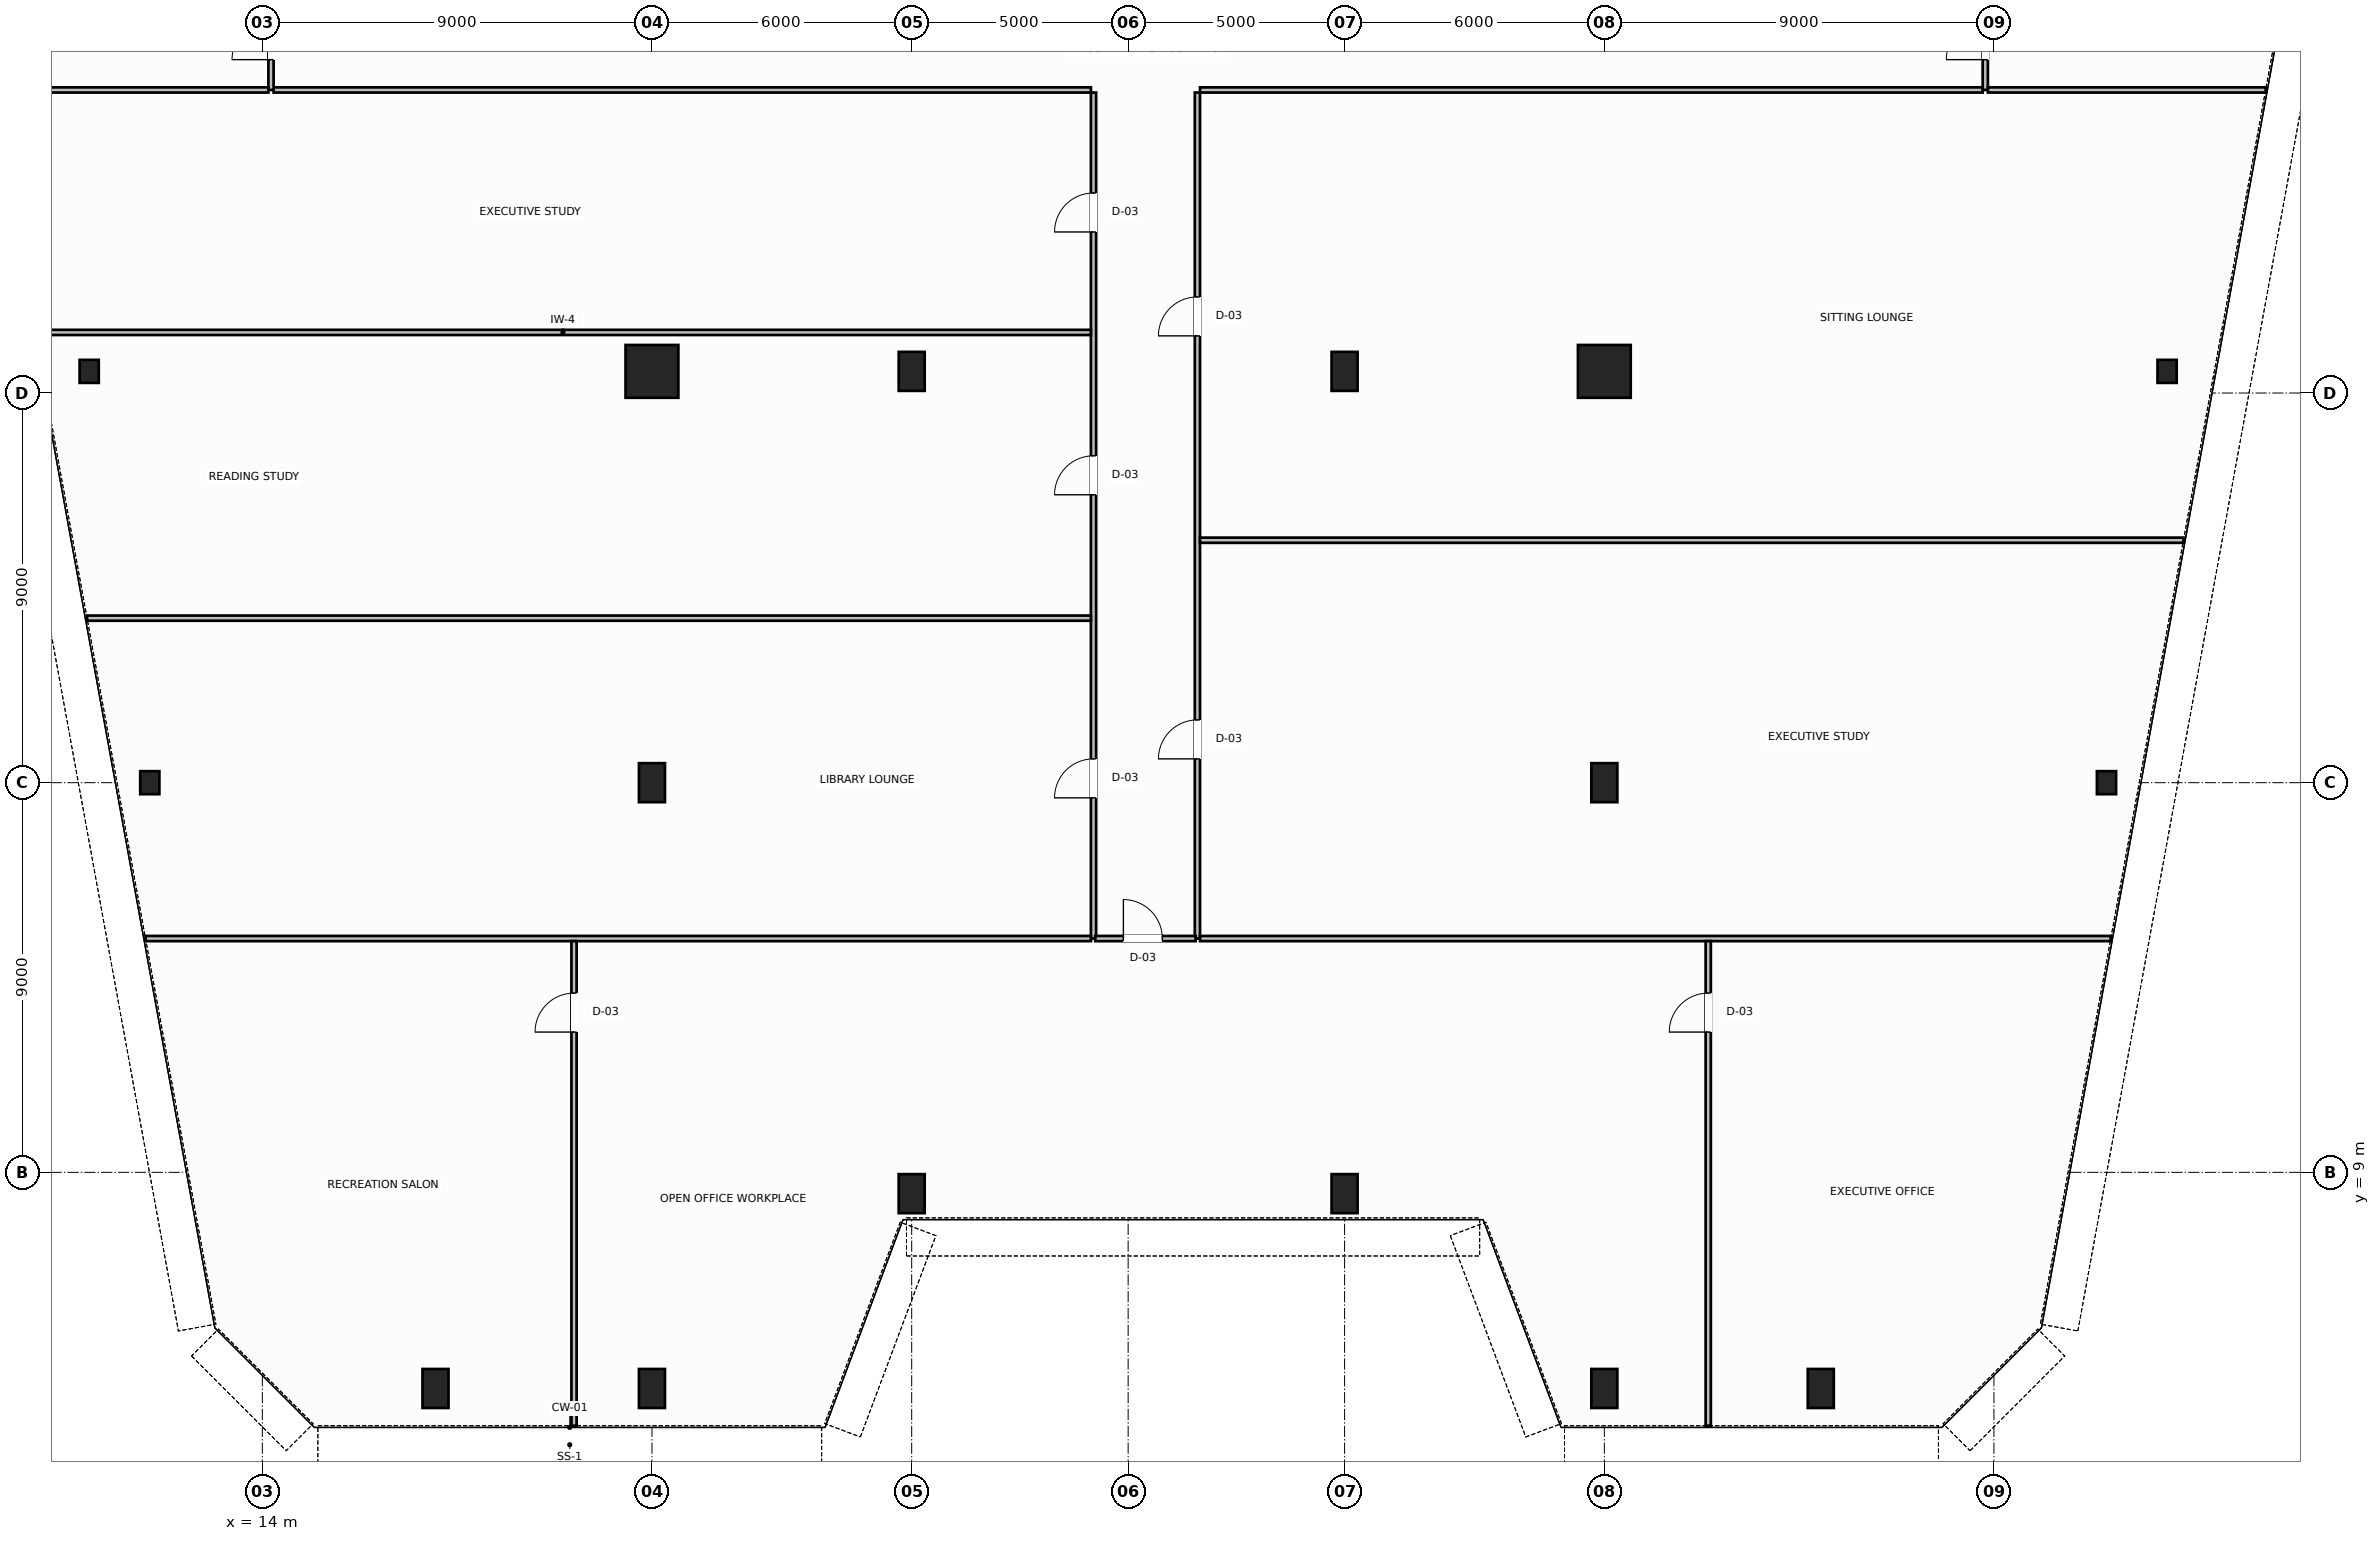
"""IFC4 building model, lengths in metres.
Left out: names, types, materials, properties, quantities, classifications, styles, units other than length and angle.
Written with IfcOpenShell. Run it as: python <this file> out.ifc"""

import sys

from ifc_helpers import new_model, si_unit, direction, frame, frame_2d, origin, origin_2d, place, context, subcontext, project, spatial, rectangle, hollow_rectangle, hollow_circle, i_section, extrude, source, transform, mapped, element, fill, save


model = new_model("IFC4")
c1 = context("Model", 3, precision=1e-05, world=origin(), true_north=direction((0.0, 1.0)))
c2 = subcontext(c1, "Body", "Model", "MODEL_VIEW")
j1 = project(units=[si_unit("LENGTHUNIT", "METRE"), si_unit("PLANEANGLEUNIT", "RADIAN")], contexts=[c1])
p1 = place(None, origin())
s1 = spatial("IfcSite", under=j1, at=p1, CompositionType="ELEMENT")
p2 = place(p1, origin())
s2 = spatial("IfcBuilding", under=s1, at=p2, CompositionType="ELEMENT")
p3 = place(p2, frame((0.0, 0.0, 68.2)))
s3 = spatial("IfcBuildingStorey", under=s2, at=p3, CompositionType="ELEMENT", Elevation=68.2)
m1 = source(origin(), c2, "Body", "SweptSolid", [
    extrude(i_section(OverallWidth=0.442, OverallDepth=0.531, WebThickness=0.065, FlangeThickness=0.076, FilletRadius=0.015, at=origin_2d()), origin(), (0.0, 0.0, 1.0), 3.8),
])
for number, where, z_axis, x_axis in (
    (1, (10.0, 27.5, 0.0), (0.0, 0.0, 1.0), (1.0, 0.0, 0.0)),
    (2, (11.4, 18.0, 0.0), (0.0, 0.0, 1.0), (1.0, 0.0, 0.0)),
    (3, (58.0, 27.5, 0.0), (0.0, 0.0, 1.0), (1.0, 0.0, 0.0)),
    (4, (56.6, 18.0, 0.0), (0.0, 0.0, 1.0), (1.0, 0.0, 0.0)),
):
    element("IfcColumn", number, at=place(p3, frame(where, z_axis=z_axis, x_axis=x_axis)), inside=s3, PredefinedType="COLUMN", context=c2, shape_type="MappedRepresentation", body=[
        mapped(m1, transform((0.0, 0.0, 0.0), scale=1.0)),
    ])
m2 = source(origin(), c2, "Body", "SweptSolid", [
    extrude(hollow_circle(Radius=0.61, WallThickness=0.05, at=origin_2d()), origin(), (0.0, 0.0, 1.0), 3.8),
])
p4 = place(p3, frame((23.0, 27.5, 0.0), z_axis=(0.0, 0.0, 1.0), x_axis=(1.0, 0.0, 0.0)))
e5 = element("IfcColumn", 5, at=p4, inside=s3, PredefinedType="COLUMN", context=c2, shape_type="MappedRepresentation", body=[
    mapped(m2, transform((0.0, 0.0, 0.0), scale=1.0)),
])
m3 = source(origin(), c2, "Body", "SweptSolid", [
    extrude(hollow_rectangle(XDim=0.6, YDim=0.9, WallThickness=0.04, InnerFilletRadius=0.04, OuterFilletRadius=0.08, at=origin_2d()), origin(), (0.0, 0.0, 1.0), 3.8),
])
for number, where, z_axis, x_axis in (
    (6, (29.0, 27.5, 0.0), (0.0, 0.0, 1.0), (1.0, 0.0, 0.0)),
    (7, (39.0, 27.5, 0.0), (0.0, 0.0, 1.0), (1.0, 0.0, 0.0)),
):
    element("IfcColumn", number, at=place(p3, frame(where, z_axis=z_axis, x_axis=x_axis)), inside=s3, PredefinedType="COLUMN", context=c2, shape_type="MappedRepresentation", body=[
        mapped(m3, transform((0.0, 0.0, 0.0), scale=1.0)),
    ])
p5 = place(p3, frame((45.0, 27.5, 0.0), z_axis=(0.0, 0.0, 1.0), x_axis=(1.0, 0.0, 0.0)))
e8 = element("IfcColumn", 8, at=p5, inside=s3, PredefinedType="COLUMN", context=c2, shape_type="MappedRepresentation", body=[
    mapped(m2, transform((0.0, 0.0, 0.0), scale=1.0)),
])
for number, where, z_axis, x_axis in (
    (9, (23.0, 18.0, 0.0), (0.0, 0.0, 1.0), (1.0, 0.0, 0.0)),
    (10, (45.0, 18.0, 0.0), (0.0, 0.0, 1.0), (1.0, 0.0, 0.0)),
):
    element("IfcColumn", number, at=place(p3, frame(where, z_axis=z_axis, x_axis=x_axis)), inside=s3, PredefinedType="COLUMN", context=c2, shape_type="MappedRepresentation", body=[
        mapped(m3, transform((0.0, 0.0, 0.0), scale=1.0)),
    ])
m4 = source(origin(), c2, "Body", "SweptSolid", [
    extrude(hollow_rectangle(XDim=0.6, YDim=0.9, WallThickness=0.04, InnerFilletRadius=0.04, OuterFilletRadius=0.08, at=origin_2d()), origin(), (0.0, 0.0, 1.0), 3.744),
])
for number, where, z_axis, x_axis in (
    (11, (18.0, 4.008, 0.032), (0.0, 0.064, 0.998), (-1.0, 0.0, 0.0)),
    (12, (23.0, 4.008, 0.032), (0.0, 0.064, 0.998), (-1.0, 0.0, 0.0)),
    (13, (29.0, 8.508, 0.032), (0.0, 0.064, 0.998), (-1.0, 0.0, 0.0)),
    (14, (39.0, 8.508, 0.032), (0.0, 0.064, 0.998), (-1.0, 0.0, 0.0)),
    (15, (45.0, 4.008, 0.032), (0.0, 0.064, 0.998), (-1.0, 0.0, 0.0)),
    (16, (50.0, 4.008, 0.032), (0.0, 0.064, 0.998), (-1.0, 0.0, 0.0)),
):
    element("IfcColumn", number, at=place(p3, frame(where, z_axis=z_axis, x_axis=x_axis)), inside=s3, PredefinedType="COLUMN", context=c2, shape_type="MappedRepresentation", body=[
        mapped(m4, transform((0.0, 0.0, 0.0), scale=1.0)),
    ])
p6 = place(p3, frame((14.26, 34.0, 0.0), z_axis=(0.0, 0.0, 1.0), x_axis=(1.0, 0.0, 0.0)))
e17 = element("IfcWall", 17, at=p6, inside=s3, PredefinedType="PARTITIONING", context=c2, shape_type="SweptSolid", body=[
    extrude(rectangle(XDim=18.88, YDim=0.12, at=frame_2d((9.44, 0.0))), origin(), (0.0, 0.0, 1.0), 3.58),
])
p7 = place(p3, frame((35.66, 34.0, 0.0), z_axis=(0.0, 0.0, 1.0), x_axis=(1.0, 0.0, 0.0)))
e18 = element("IfcWall", 18, at=p7, inside=s3, PredefinedType="PARTITIONING", context=c2, shape_type="SweptSolid", body=[
    extrude(rectangle(XDim=18.08, YDim=0.12, at=frame_2d((9.04, 0.0))), origin(), (0.0, 0.0, 1.0), 3.58),
])
p8 = place(p3, frame((14.2, 34.0, 0.0), z_axis=(0.0, 0.0, 1.0), x_axis=(0.0, 1.0, 0.0)))
e19 = element("IfcWall", 19, at=p8, inside=s3, PredefinedType="PARTITIONING", context=c2, shape_type="SweptSolid", body=[
    extrude(rectangle(XDim=2.44, YDim=0.12, at=frame_2d((1.22, 0.0))), origin(), (0.0, 0.0, 1.0), 3.58),
])
p9 = place(p8, frame((0.7, 0.0, 0.0)))
e20 = element("IfcOpeningElement", 20, at=p9, cuts=e19, PredefinedType="OPENING", context=c2, shape_type="SweptSolid", body=[
    extrude(rectangle(XDim=0.9, YDim=2.15, at=frame_2d((0.45, 1.075))), frame((0.0, 0.07, 0.0), z_axis=(0.0, -1.0, 0.0), x_axis=(1.0, 0.0, 0.0)), (0.0, 0.0, 1.0), 0.14),
])
p10 = place(p3, frame((53.8, 34.0, 0.0), z_axis=(0.0, 0.0, 1.0), x_axis=(0.0, 1.0, 0.0)))
e21 = element("IfcWall", 21, at=p10, inside=s3, PredefinedType="PARTITIONING", context=c2, shape_type="SweptSolid", body=[
    extrude(rectangle(XDim=2.44, YDim=0.12, at=frame_2d((1.22, 0.0))), origin(), (0.0, 0.0, 1.0), 3.58),
])
p11 = place(p10, frame((0.7, 0.0, 0.0)))
e22 = element("IfcOpeningElement", 22, at=p11, cuts=e21, PredefinedType="OPENING", context=c2, shape_type="SweptSolid", body=[
    extrude(rectangle(XDim=0.9, YDim=2.15, at=frame_2d((0.45, 1.075))), frame((0.0, 0.07, 0.0), z_axis=(0.0, -1.0, 0.0), x_axis=(1.0, 0.0, 0.0)), (0.0, 0.0, 1.0), 0.14),
])
p12 = place(p3, frame((33.2, 14.4, 0.0), z_axis=(0.0, 0.0, 1.0), x_axis=(0.0, 1.0, 0.0)))
e23 = element("IfcWall", 23, at=p12, inside=s3, PredefinedType="PARTITIONING", context=c2, shape_type="SweptSolid", body=[
    extrude(rectangle(XDim=19.54, YDim=0.12, at=frame_2d((9.77, 0.0))), origin(), (0.0, 0.0, 1.0), 3.58),
])
p13 = place(p12, frame((3.25, 0.0, 0.0)))
e24 = element("IfcOpeningElement", 24, at=p13, cuts=e23, PredefinedType="OPENING", context=c2, shape_type="SweptSolid", body=[
    extrude(rectangle(XDim=0.9, YDim=2.15, at=frame_2d((0.45, 1.075))), frame((0.0, 0.07, 0.0), z_axis=(0.0, -1.0, 0.0), x_axis=(1.0, 0.0, 0.0)), (0.0, 0.0, 1.0), 0.14),
])
p14 = place(p12, frame((10.25, 0.0, 0.0)))
e25 = element("IfcOpeningElement", 25, at=p14, cuts=e23, PredefinedType="OPENING", context=c2, shape_type="SweptSolid", body=[
    extrude(rectangle(XDim=0.9, YDim=2.15, at=frame_2d((0.45, 1.075))), frame((0.0, 0.07, 0.0), z_axis=(0.0, -1.0, 0.0), x_axis=(1.0, 0.0, 0.0)), (0.0, 0.0, 1.0), 0.14),
])
p15 = place(p12, frame((16.32, 0.0, 0.0)))
e26 = element("IfcOpeningElement", 26, at=p15, cuts=e23, PredefinedType="OPENING", context=c2, shape_type="SweptSolid", body=[
    extrude(rectangle(XDim=0.9, YDim=2.15, at=frame_2d((0.45, 1.075))), frame((0.0, 0.07, 0.0), z_axis=(0.0, -1.0, 0.0), x_axis=(1.0, 0.0, 0.0)), (0.0, 0.0, 1.0), 0.14),
])
p16 = place(p3, frame((35.6, 14.4, 0.0), z_axis=(0.0, 0.0, 1.0), x_axis=(0.0, 1.0, 0.0)))
e27 = element("IfcWall", 27, at=p16, inside=s3, PredefinedType="PARTITIONING", context=c2, shape_type="SweptSolid", body=[
    extrude(rectangle(XDim=19.54, YDim=0.12, at=frame_2d((9.77, 0.0))), origin(), (0.0, 0.0, 1.0), 3.58),
])
p17 = place(p16, frame((4.15, 0.0, 0.0)))
e28 = element("IfcOpeningElement", 28, at=p17, cuts=e27, PredefinedType="OPENING", context=c2, shape_type="SweptSolid", body=[
    extrude(rectangle(XDim=0.9, YDim=2.15, at=frame_2d((0.45, 1.075))), frame((0.0, 0.07, 0.0), z_axis=(0.0, -1.0, 0.0), x_axis=(1.0, 0.0, 0.0)), (0.0, 0.0, 1.0), 0.14),
])
p18 = place(p16, frame((13.92, 0.0, 0.0)))
e29 = element("IfcOpeningElement", 29, at=p18, cuts=e27, PredefinedType="OPENING", context=c2, shape_type="SweptSolid", body=[
    extrude(rectangle(XDim=0.9, YDim=2.15, at=frame_2d((0.45, 1.075))), frame((0.0, 0.07, 0.0), z_axis=(0.0, -1.0, 0.0), x_axis=(1.0, 0.0, 0.0)), (0.0, 0.0, 1.0), 0.14),
])
p19 = place(p3, frame((33.24, 14.4, 0.0), z_axis=(0.0, 0.0, 1.0), x_axis=(1.0, 0.0, 0.0)))
e30 = element("IfcWall", 30, at=p19, inside=s3, PredefinedType="PARTITIONING", context=c2, shape_type="SweptSolid", body=[
    extrude(rectangle(XDim=2.32, YDim=0.12, at=frame_2d((1.16, 0.0))), origin(), (0.0, 0.0, 1.0), 3.58),
])
p20 = place(p19, frame((0.65, 0.0, 0.0)))
e31 = element("IfcOpeningElement", 31, at=p20, cuts=e30, PredefinedType="OPENING", context=c2, shape_type="SweptSolid", body=[
    extrude(rectangle(XDim=0.9, YDim=2.15, at=frame_2d((0.45, 1.075))), frame((0.0, 0.07, 0.0), z_axis=(0.0, -1.0, 0.0), x_axis=(1.0, 0.0, 0.0)), (0.0, 0.0, 1.0), 0.14),
])
for number, where, z_axis, x_axis in (
    (32, (7.723, 34.0, 0.0), (0.0, 0.0, 1.0), (1.0, 0.0, 0.0)),
    (33, (53.86, 34.0, 0.0), (0.0, 0.0, 1.0), (1.0, 0.0, 0.0)),
):
    element("IfcWall", number, at=place(p3, frame(where, z_axis=z_axis, x_axis=x_axis)), inside=s3, PredefinedType="PARTITIONING", context=c2, shape_type="SweptSolid", body=[
        extrude(rectangle(XDim=6.417, YDim=0.12, at=frame_2d((3.208, 0.0))), origin(), (0.0, 0.0, 1.0), 3.58),
    ])
p21 = place(p3, frame((9.95, 21.8, 0.0), z_axis=(0.0, 0.0, 1.0), x_axis=(1.0, 0.0, 0.0)))
e34 = element("IfcWall", 34, at=p21, inside=s3, PredefinedType="PARTITIONING", context=c2, shape_type="SweptSolid", body=[
    extrude(rectangle(XDim=23.19, YDim=0.12, at=frame_2d((11.595, 0.0))), origin(), (0.0, 0.0, 1.0), 3.58),
])
p22 = place(p3, frame((8.745, 28.4, 0.0), z_axis=(0.0, 0.0, 1.0), x_axis=(1.0, 0.0, 0.0)))
e35 = element("IfcWall", 35, at=p22, inside=s3, PredefinedType="PARTITIONING", context=c2, shape_type="SweptSolid", body=[
    extrude(rectangle(XDim=24.395, YDim=0.12, at=frame_2d((12.197, 0.0))), origin(), (0.0, 0.0, 1.0), 3.58),
])
p23 = place(p3, frame((35.66, 23.6, 0.0), z_axis=(0.0, 0.0, 1.0), x_axis=(1.0, 0.0, 0.0)))
e36 = element("IfcWall", 36, at=p23, inside=s3, PredefinedType="PARTITIONING", context=c2, shape_type="SweptSolid", body=[
    extrude(rectangle(XDim=22.719, YDim=0.12, at=frame_2d((11.359, 0.0))), origin(), (0.0, 0.0, 1.0), 3.58),
])
p24 = place(p3, frame((11.301, 14.4, 0.0), z_axis=(0.0, 0.0, 1.0), x_axis=(1.0, 0.0, 0.0)))
e37 = element("IfcWall", 37, at=p24, inside=s3, PredefinedType="PARTITIONING", context=c2, shape_type="SweptSolid", body=[
    extrude(rectangle(XDim=21.839, YDim=0.12, at=frame_2d((10.919, 0.0))), origin(), (0.0, 0.0, 1.0), 3.58),
])
p25 = place(p3, frame((35.66, 14.4, 0.0), z_axis=(0.0, 0.0, 1.0), x_axis=(1.0, 0.0, 0.0)))
e38 = element("IfcWall", 38, at=p25, inside=s3, PredefinedType="PARTITIONING", context=c2, shape_type="SweptSolid", body=[
    extrude(rectangle(XDim=21.039, YDim=0.12, at=frame_2d((10.52, 0.0))), origin(), (0.0, 0.0, 1.0), 3.58),
])
p26 = place(p3, frame((21.2, 3.148, 0.0), z_axis=(0.0, 0.0, 1.0), x_axis=(0.0, 1.0, 0.0)))
e39 = element("IfcWall", 39, at=p26, inside=s3, PredefinedType="PARTITIONING", context=c2, shape_type="SweptSolid", body=[
    extrude(rectangle(XDim=11.192, YDim=0.12, at=frame_2d((5.596, 0.0))), origin(), (0.0, 0.0, 1.0), 3.58),
])
p27 = place(p26, frame((9.092, 0.0, 0.0)))
e40 = element("IfcOpeningElement", 40, at=p27, cuts=e39, PredefinedType="OPENING", context=c2, shape_type="SweptSolid", body=[
    extrude(rectangle(XDim=0.9, YDim=2.15, at=frame_2d((0.45, 1.075))), frame((0.0, 0.07, 0.0), z_axis=(0.0, -1.0, 0.0), x_axis=(1.0, 0.0, 0.0)), (0.0, 0.0, 1.0), 0.14),
])
p28 = place(p3, frame((47.4, 3.148, 0.0), z_axis=(0.0, 0.0, 1.0), x_axis=(0.0, 1.0, 0.0)))
e41 = element("IfcWall", 41, at=p28, inside=s3, PredefinedType="PARTITIONING", context=c2, shape_type="SweptSolid", body=[
    extrude(rectangle(XDim=11.192, YDim=0.12, at=frame_2d((5.596, 0.0))), origin(), (0.0, 0.0, 1.0), 3.58),
])
p29 = place(p28, frame((9.092, 0.0, 0.0)))
e42 = element("IfcOpeningElement", 42, at=p29, cuts=e41, PredefinedType="OPENING", context=c2, shape_type="SweptSolid", body=[
    extrude(rectangle(XDim=0.9, YDim=2.15, at=frame_2d((0.45, 1.075))), frame((0.0, 0.07, 0.0), z_axis=(0.0, -1.0, 0.0), x_axis=(1.0, 0.0, 0.0)), (0.0, 0.0, 1.0), 0.14),
])
m5 = source(origin(), c2, "Body", "SweptSolid", [
    extrude(rectangle(XDim=0.9, YDim=2.15, at=frame_2d((0.45, 1.075))), frame((0.0, 0.025, 0.0), z_axis=(0.0, -1.0, 0.0), x_axis=(1.0, 0.0, 0.0)), (0.0, 0.0, 1.0), 0.05),
])
p30 = place(p9, origin())
e43 = element("IfcDoor", 43, at=p30, inside=s3, OperationType="SINGLE_SWING_LEFT", PredefinedType="DOOR", context=c2, shape_type="MappedRepresentation", body=[
    mapped(m5, transform((0.0, 0.0, 0.0), scale=1.0)),
])
fill(e20, e43)
p31 = place(p11, origin())
e44 = element("IfcDoor", 44, at=p31, inside=s3, OperationType="SINGLE_SWING_RIGHT", PredefinedType="DOOR", context=c2, shape_type="MappedRepresentation", body=[
    mapped(m5, transform((0.0, 0.0, 0.0), scale=1.0)),
])
fill(e22, e44)
p32 = place(p13, origin())
e45 = element("IfcDoor", 45, at=p32, inside=s3, OperationType="SINGLE_SWING_LEFT", PredefinedType="DOOR", context=c2, shape_type="MappedRepresentation", body=[
    mapped(m5, transform((0.0, 0.0, 0.0), scale=1.0)),
])
fill(e24, e45)
p33 = place(p14, origin())
e46 = element("IfcDoor", 46, at=p33, inside=s3, OperationType="SINGLE_SWING_RIGHT", PredefinedType="DOOR", context=c2, shape_type="MappedRepresentation", body=[
    mapped(m5, transform((0.0, 0.0, 0.0), scale=1.0)),
])
fill(e25, e46)
p34 = place(p15, origin())
e47 = element("IfcDoor", 47, at=p34, inside=s3, OperationType="SINGLE_SWING_LEFT", PredefinedType="DOOR", context=c2, shape_type="MappedRepresentation", body=[
    mapped(m5, transform((0.0, 0.0, 0.0), scale=1.0)),
])
fill(e26, e47)
p35 = place(p17, origin())
e48 = element("IfcDoor", 48, at=p35, inside=s3, OperationType="SINGLE_SWING_RIGHT", PredefinedType="DOOR", context=c2, shape_type="MappedRepresentation", body=[
    mapped(m5, transform((0.0, 0.0, 0.0), scale=1.0)),
])
fill(e28, e48)
p36 = place(p18, origin())
e49 = element("IfcDoor", 49, at=p36, inside=s3, OperationType="SINGLE_SWING_LEFT", PredefinedType="DOOR", context=c2, shape_type="MappedRepresentation", body=[
    mapped(m5, transform((0.0, 0.0, 0.0), scale=1.0)),
])
fill(e29, e49)
p37 = place(p27, origin())
e50 = element("IfcDoor", 50, at=p37, inside=s3, OperationType="SINGLE_SWING_RIGHT", PredefinedType="DOOR", context=c2, shape_type="MappedRepresentation", body=[
    mapped(m5, transform((0.0, 0.0, 0.0), scale=1.0)),
])
fill(e40, e50)
p38 = place(p20, origin())
e51 = element("IfcDoor", 51, at=p38, inside=s3, OperationType="SINGLE_SWING_LEFT", PredefinedType="DOOR", context=c2, shape_type="MappedRepresentation", body=[
    mapped(m5, transform((0.0, 0.0, 0.0), scale=1.0)),
])
fill(e31, e51)
p39 = place(p29, origin())
e52 = element("IfcDoor", 52, at=p39, inside=s3, OperationType="SINGLE_SWING_LEFT", PredefinedType="DOOR", context=c2, shape_type="MappedRepresentation", body=[
    mapped(m5, transform((0.0, 0.0, 0.0), scale=1.0)),
])
fill(e42, e52)
save(model, sys.argv[1])
